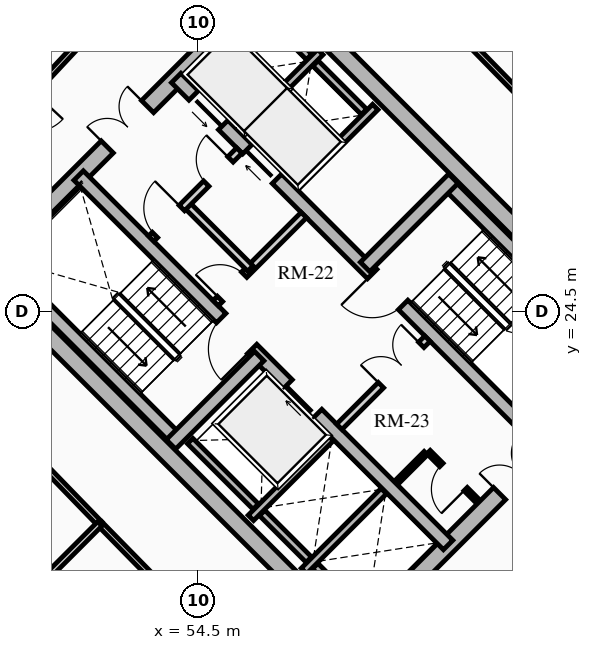
"""IFC4 building model, lengths in metres.
Left out: names, types, materials, properties, quantities, classifications, styles, units other than length and angle.
Written with IfcOpenShell. Run it as: python <this file> out.ifc"""

import sys

from ifc_helpers import new_model, si_unit, direction, frame, frame_2d, origin, place, context, subcontext, project, spatial, rectangle, extrude, source, transform, mapped, element, fill, save


model = new_model("IFC4")
c1 = context("Model", 3, precision=1e-05, world=origin(), true_north=direction((0.0, 1.0)))
c2 = subcontext(c1, "Body", "Model", "MODEL_VIEW")
j1 = project(units=[si_unit("LENGTHUNIT", "METRE"), si_unit("PLANEANGLEUNIT", "RADIAN")], contexts=[c1])
p1 = place(None, origin())
s1 = spatial("IfcSite", under=j1, at=p1, CompositionType="ELEMENT")
p2 = place(p1, origin())
s2 = spatial("IfcBuilding", under=s1, at=p2, CompositionType="ELEMENT")
p3 = place(p2, frame((0.0, 0.0, 78.88)))
s3 = spatial("IfcBuildingStorey", under=s2, at=p3, CompositionType="ELEMENT", Elevation=78.88)
for number, where, z_axis, x_axis in (
    (1, (58.737, 15.697, 0.0), (0.0, 0.0, 1.0), (-0.707, 0.707, 0.0)),
    (2, (66.303, 23.263, 0.0), (0.0, 0.0, 1.0), (-0.707, 0.707, 0.0)),
):
    element("IfcWall", number, at=place(p3, frame(where, z_axis=z_axis, x_axis=x_axis)), inside=s3, PredefinedType="SHEAR", context=c2, shape_type="SweptSolid", body=[
        extrude(rectangle(XDim=14.2, YDim=0.45, at=frame_2d((7.1, 0.0))), origin(), (0.0, 0.0, 1.0), 2.91),
    ])
p4 = place(p3, frame((58.578, 15.856, 0.0), z_axis=(0.0, 0.0, 1.0), x_axis=(0.707106781187, 0.707106781187, 0.0)))
e3 = element("IfcWall", 3, at=p4, inside=s3, PredefinedType="SHEAR", context=c2, shape_type="SweptSolid", body=[
    extrude(rectangle(XDim=10.7, YDim=0.45, at=frame_2d((5.35, 0.0))), origin(), (0.0, 0.0, 1.0), 2.91),
])
m1 = source(origin(), c2, "Body", "SweptSolid", [
    extrude(rectangle(XDim=1.5, YDim=2.02, at=frame_2d((0.75, 1.01))), frame((0.0, 0.235, 0.0), z_axis=(0.0, -1.0, 0.0), x_axis=(1.0, 0.0, 0.0)), (0.0, 0.0, 1.0), 0.47),
])
p5 = place(p4, frame((5.45, 0.0, 0.0)))
e4 = element("IfcOpeningElement", 4, at=p5, cuts=e3, PredefinedType="OPENING", context=c2, shape_type="MappedRepresentation", body=[
    mapped(m1, transform((0.0, 0.0, 0.0), x_axis=(1.0, 0.0, 0.0), y_axis=(0.0, 1.0, 0.0), z_axis=(0.0, 0.0, 1.0), scale=1.0)),
])
p6 = place(p3, frame((48.856, 25.578, 0.0), z_axis=(0.0, 0.0, 1.0), x_axis=(0.707106781187, 0.707106781187, 0.0)))
e5 = element("IfcWall", 5, at=p6, inside=s3, PredefinedType="SHEAR", context=c2, shape_type="SweptSolid", body=[
    extrude(rectangle(XDim=10.7, YDim=0.45, at=frame_2d((5.35, 0.0))), origin(), (0.0, 0.0, 1.0), 2.91),
])
p7 = place(p6, frame((4.6, 0.0, 0.0)))
e6 = element("IfcOpeningElement", 6, at=p7, cuts=e5, PredefinedType="OPENING", context=c2, shape_type="MappedRepresentation", body=[
    mapped(m1, transform((0.0, 0.0, 0.0), x_axis=(1.0, 0.0, 0.0), y_axis=(0.0, 1.0, 0.0), z_axis=(0.0, 0.0, 1.0), scale=1.0)),
])
p8 = place(p3, frame((61.078, 18.355, 0.0), z_axis=(0.0, 0.0, 1.0), x_axis=(-0.707106781187, 0.707106781187, 0.0)))
e7 = element("IfcWall", 7, at=p8, inside=s3, PredefinedType="SHEAR", context=c2, shape_type="SweptSolid", body=[
    extrude(rectangle(XDim=13.75, YDim=0.35, at=frame_2d((6.875, 0.0))), origin(), (0.0, 0.0, 1.0), 2.91),
])
m2 = source(origin(), c2, "Body", "SweptSolid", [
    extrude(rectangle(XDim=1.1, YDim=2.015, at=frame_2d((0.55, 1.007))), frame((0.0, 0.185, 0.0), z_axis=(0.0, -1.0, 0.0), x_axis=(1.0, 0.0, 0.0)), (0.0, 0.0, 1.0), 0.37),
])
p9 = place(p8, frame((4.875, 0.0, 0.0)))
e8 = element("IfcOpeningElement", 8, at=p9, cuts=e7, PredefinedType="OPENING", context=c2, shape_type="MappedRepresentation", body=[
    mapped(m2, transform((0.0, 0.0, 0.0), x_axis=(1.0, 0.0, 0.0), y_axis=(0.0, 1.0, 0.0), z_axis=(0.0, 0.0, 1.0), scale=1.0)),
])
m3 = source(origin(), c2, "Body", "SweptSolid", [
    extrude(rectangle(XDim=1.15, YDim=2.02, at=frame_2d((0.575, 1.01))), frame((0.0, 0.185, 0.0), z_axis=(0.0, -1.0, 0.0), x_axis=(1.0, 0.0, 0.0)), (0.0, 0.0, 1.0), 0.37),
])
p10 = place(p8, frame((7.295, 0.0, 0.0)))
e9 = element("IfcOpeningElement", 9, at=p10, cuts=e7, PredefinedType="OPENING", context=c2, shape_type="MappedRepresentation", body=[
    mapped(m3, transform((0.0, 0.0, 0.0), x_axis=(1.0, 0.0, 0.0), y_axis=(0.0, 1.0, 0.0), z_axis=(0.0, 0.0, 1.0), scale=1.0)),
])
p11 = place(p3, frame((63.645, 20.922, 0.0), z_axis=(0.0, 0.0, 1.0), x_axis=(-0.707106781187, 0.707106781187, 0.0)))
e10 = element("IfcWall", 10, at=p11, inside=s3, PredefinedType="SHEAR", context=c2, shape_type="SweptSolid", body=[
    extrude(rectangle(XDim=13.75, YDim=0.35, at=frame_2d((6.875, 0.0))), origin(), (0.0, 0.0, 1.0), 2.91),
])
p12 = place(p11, frame((10.0, 0.0, 0.0)))
e11 = element("IfcOpeningElement", 11, at=p12, cuts=e10, PredefinedType="OPENING", context=c2, shape_type="MappedRepresentation", body=[
    mapped(m2, transform((0.0, 0.0, 0.0), x_axis=(1.0, 0.0, 0.0), y_axis=(0.0, 1.0, 0.0), z_axis=(0.0, 0.0, 1.0), scale=1.0)),
])
p13 = place(p11, frame((12.0, 0.0, 0.0)))
e12 = element("IfcOpeningElement", 12, at=p13, cuts=e10, PredefinedType="OPENING", context=c2, shape_type="MappedRepresentation", body=[
    mapped(m2, transform((0.0, 0.0, 0.0), x_axis=(1.0, 0.0, 0.0), y_axis=(0.0, 1.0, 0.0), z_axis=(0.0, 0.0, 1.0), scale=1.0)),
])
p14 = place(p11, frame((5.305, 0.0, 0.0)))
e13 = element("IfcOpeningElement", 13, at=p14, cuts=e10, PredefinedType="OPENING", context=c2, shape_type="MappedRepresentation", body=[
    mapped(m3, transform((0.0, 0.0, 0.0), x_axis=(1.0, 0.0, 0.0), y_axis=(0.0, 1.0, 0.0), z_axis=(0.0, 0.0, 1.0), scale=1.0)),
])
p15 = place(p3, frame((53.922, 21.141, 0.0), z_axis=(0.0, 0.0, 1.0), x_axis=(-0.707088616009, 0.707124945897, 0.0)))
e14 = element("IfcWall", 14, at=p15, inside=s3, PredefinedType="SHEAR", context=c2, shape_type="SweptSolid", body=[
    extrude(rectangle(XDim=6.72, YDim=0.35, at=frame_2d((3.36, 0.0))), origin(), (0.0, 0.0, 1.0), 2.91),
])
p16 = place(p3, frame((53.784, 21.003, 0.0), z_axis=(0.0, 0.0, 1.0), x_axis=(0.707106781187, 0.707106781187, 0.0)))
e15 = element("IfcWall", 15, at=p16, inside=s3, PredefinedType="SHEAR", context=c2, shape_type="SweptSolid", body=[
    extrude(rectangle(XDim=3.285, YDim=0.35, at=frame_2d((1.643, 0.0))), origin(), (0.0, 0.0, 1.0), 2.91),
])
p17 = place(p3, frame((65.83, 23.107, 0.0), z_axis=(0.0, 0.0, 1.0), x_axis=(-0.707088616009, 0.707124945897, 0.0)))
e16 = element("IfcWall", 16, at=p17, inside=s3, PredefinedType="SHEAR", context=c2, shape_type="SweptSolid", body=[
    extrude(rectangle(XDim=6.72, YDim=0.35, at=frame_2d((3.36, 0.0))), origin(), (0.0, 0.0, 1.0), 2.91),
])
p18 = place(p3, frame((58.893, 25.674, 0.0), z_axis=(0.0, 0.0, 1.0), x_axis=(0.707106781187, 0.707106781187, 0.0)))
e17 = element("IfcWall", 17, at=p18, inside=s3, PredefinedType="SHEAR", context=c2, shape_type="SweptSolid", body=[
    extrude(rectangle(XDim=3.285, YDim=0.35, at=frame_2d((1.643, 0.0))), origin(), (0.0, 0.0, 1.0), 2.91),
])
p19 = place(p3, frame((55.888, 19.069, 0.0), z_axis=(0.0, 0.0, 1.0), x_axis=(0.707106781187, 0.707106781187, 0.0)))
e18 = element("IfcWall", 18, at=p19, inside=s3, PredefinedType="SHEAR", context=c2, shape_type="SweptSolid", body=[
    extrude(rectangle(XDim=2.97, YDim=0.2, at=frame_2d((1.485, 0.0))), origin(), (0.0, 0.0, 1.0), 2.91),
])
p20 = place(p3, frame((56.015, 19.366, 0.0), z_axis=(0.0, 0.0, 1.0), x_axis=(-0.707106781187, 0.707106781187, 0.0)))
e19 = element("IfcWall", 19, at=p20, inside=s3, PredefinedType="SHEAR", context=c2, shape_type="SweptSolid", body=[
    extrude(rectangle(XDim=2.44, YDim=0.2, at=frame_2d((1.22, 0.0))), origin(), (0.0, 0.0, 1.0), 2.91),
])
p21 = place(p3, frame((57.284, 17.673, 0.0), z_axis=(0.0, 0.0, 1.0), x_axis=(0.707147878904, 0.70706568108, 0.0)))
e20 = element("IfcWall", 20, at=p21, inside=s3, PredefinedType="SHEAR", context=c2, shape_type="SweptSolid", body=[
    extrude(rectangle(XDim=2.97, YDim=0.2, at=frame_2d((1.485, 0.0))), origin(), (0.0, 0.0, 1.0), 2.91),
])
p22 = place(p3, frame((57.412, 17.97, 0.0), z_axis=(0.0, 0.0, 1.0), x_axis=(-0.707106781187, 0.707106781187, 0.0)))
e21 = element("IfcWall", 21, at=p22, inside=s3, PredefinedType="SHEAR", context=c2, shape_type="SweptSolid", body=[
    extrude(rectangle(XDim=1.735, YDim=0.2, at=frame_2d((0.867, 0.0))), origin(), (0.0, 0.0, 1.0), 2.91),
])
p23 = place(p3, frame((58.737, 16.644, 0.0), z_axis=(0.0, 0.0, 1.0), x_axis=(-0.707032117043, 0.707181437447, 0.0)))
e22 = element("IfcWall", 22, at=p23, inside=s3, PredefinedType="SHEAR", context=c2, shape_type="SweptSolid", body=[
    extrude(rectangle(XDim=1.635, YDim=0.2, at=frame_2d((0.817, 0.0))), origin(), (0.0, 0.0, 1.0), 2.91),
])
p24 = place(p3, frame((57.062, 27.781, 0.0), z_axis=(0.0, 0.0, 1.0), x_axis=(0.707106781187, 0.707106781187, 0.0)))
e23 = element("IfcWall", 23, at=p24, inside=s3, PredefinedType="SHEAR", context=c2, shape_type="SweptSolid", body=[
    extrude(rectangle(XDim=2.97, YDim=0.2, at=frame_2d((1.485, 0.0))), origin(), (0.0, 0.0, 1.0), 2.91),
])
p25 = place(p3, frame((55.615, 29.227, 0.0), z_axis=(0.0, 0.0, 1.0), x_axis=(0.707147878904, 0.70706568108, 0.0)))
e24 = element("IfcWall", 24, at=p25, inside=s3, PredefinedType="SHEAR", context=c2, shape_type="SweptSolid", body=[
    extrude(rectangle(XDim=2.97, YDim=0.2, at=frame_2d((1.485, 0.0))), origin(), (0.0, 0.0, 1.0), 2.91),
])
p26 = place(p3, frame((58.865, 29.754, 0.0), z_axis=(0.0, 0.0, 1.0), x_axis=(-0.707174411312, 0.707039144592, 0.0)))
e25 = element("IfcWall", 25, at=p26, inside=s3, PredefinedType="SHEAR", context=c2, shape_type="SweptSolid", body=[
    extrude(rectangle(XDim=1.805, YDim=0.2, at=frame_2d((0.902, 0.0))), origin(), (0.0, 0.0, 1.0), 2.91),
])
p27 = place(p3, frame((57.419, 31.2, 0.0), z_axis=(0.0, 0.0, 1.0), x_axis=(-0.707032117043, 0.707181437447, 0.0)))
e26 = element("IfcWall", 26, at=p27, inside=s3, PredefinedType="SHEAR", context=c2, shape_type="SweptSolid", body=[
    extrude(rectangle(XDim=1.635, YDim=0.2, at=frame_2d((0.817, 0.0))), origin(), (0.0, 0.0, 1.0), 2.91),
])
p28 = place(p3, frame((58.214, 21.467, 0.0), z_axis=(0.0, 0.0, 1.0), x_axis=(0.707106781187, 0.707106781187, 0.0)))
e27 = element("IfcWall", 27, at=p28, inside=s3, PredefinedType="PARTITIONING", context=c2, shape_type="SweptSolid", body=[
    extrude(rectangle(XDim=3.28, YDim=0.2, at=frame_2d((1.64, 0.0))), origin(), (0.0, 0.0, 1.0), 2.655),
])
m4 = source(origin(), c2, "Body", "SweptSolid", [
    extrude(rectangle(XDim=1.5, YDim=2.02, at=frame_2d((0.75, 1.01))), frame((0.0, 0.11, 0.0), z_axis=(0.0, -1.0, 0.0), x_axis=(1.0, 0.0, 0.0)), (0.0, 0.0, 1.0), 0.22),
])
p29 = place(p28, frame((1.55, 0.0, 0.0)))
e28 = element("IfcOpeningElement", 28, at=p29, cuts=e27, PredefinedType="OPENING", context=c2, shape_type="MappedRepresentation", body=[
    mapped(m4, transform((0.0, 0.0, 0.0), x_axis=(1.0, 0.0, 0.0), y_axis=(0.0, 1.0, 0.0), z_axis=(0.0, 0.0, 1.0), scale=1.0)),
])
p30 = place(p3, frame((54.961, 24.719, 0.0), z_axis=(0.0, 0.0, 1.0), x_axis=(0.707106781187, 0.707106781187, 0.0)))
e29 = element("IfcWall", 29, at=p30, inside=s3, PredefinedType="PARTITIONING", context=c2, shape_type="SweptSolid", body=[
    extrude(rectangle(XDim=3.28, YDim=0.2, at=frame_2d((1.64, 0.0))), origin(), (0.0, 0.0, 1.0), 2.655),
])
m5 = source(origin(), c2, "Body", "SweptSolid", [
    extrude(rectangle(XDim=0.9, YDim=2.005, at=frame_2d((0.45, 1.002))), frame((0.0, 0.11, 0.0), z_axis=(0.0, -1.0, 0.0), x_axis=(1.0, 0.0, 0.0)), (0.0, 0.0, 1.0), 0.22),
])
p31 = place(p30, frame((0.16, 0.0, 0.0)))
e30 = element("IfcOpeningElement", 30, at=p31, cuts=e29, PredefinedType="OPENING", context=c2, shape_type="MappedRepresentation", body=[
    mapped(m5, transform((0.0, 0.0, 0.0), x_axis=(1.0, 0.0, 0.0), y_axis=(0.0, 1.0, 0.0), z_axis=(0.0, 0.0, 1.0), scale=1.0)),
])
p32 = place(p3, frame((55.874, 25.631, 0.0), z_axis=(0.0, 0.0, 1.0), x_axis=(-0.707157639372, 0.707055919343, 0.0)))
e31 = element("IfcWall", 31, at=p32, inside=s3, PredefinedType="PARTITIONING", context=c2, shape_type="SweptSolid", body=[
    extrude(rectangle(XDim=2.4, YDim=0.2, at=frame_2d((1.2, 0.0))), origin(), (0.0, 0.0, 1.0), 2.655),
])
p33 = place(p3, frame((53.264, 26.416, 0.0), z_axis=(0.0, 0.0, 1.0), x_axis=(0.707106781187, 0.707106781187, 0.0)))
e32 = element("IfcWall", 32, at=p33, inside=s3, PredefinedType="PARTITIONING", context=c2, shape_type="SweptSolid", body=[
    extrude(rectangle(XDim=3.28, YDim=0.2, at=frame_2d((1.64, 0.0))), origin(), (0.0, 0.0, 1.0), 2.655),
])
m6 = source(origin(), c2, "Body", "SweptSolid", [
    extrude(rectangle(XDim=1.0, YDim=2.015, at=frame_2d((0.5, 1.007))), frame((0.0, 0.11, 0.0), z_axis=(0.0, -1.0, 0.0), x_axis=(1.0, 0.0, 0.0)), (0.0, 0.0, 1.0), 0.22),
])
p34 = place(p33, frame((0.14, 0.0, 0.0)))
e33 = element("IfcOpeningElement", 33, at=p34, cuts=e32, PredefinedType="OPENING", context=c2, shape_type="MappedRepresentation", body=[
    mapped(m6, transform((0.0, 0.0, 0.0), x_axis=(1.0, 0.0, 0.0), y_axis=(0.0, 1.0, 0.0), z_axis=(0.0, 0.0, 1.0), scale=1.0)),
])
p35 = place(p33, frame((2.05, 0.0, 0.0)))
e34 = element("IfcOpeningElement", 34, at=p35, cuts=e32, PredefinedType="OPENING", context=c2, shape_type="MappedRepresentation", body=[
    mapped(m5, transform((0.0, 0.0, 0.0), x_axis=(1.0, 0.0, 0.0), y_axis=(0.0, 1.0, 0.0), z_axis=(0.0, 0.0, 1.0), scale=1.0)),
])
p36 = place(p3, frame((61.835, 19.529, 0.0), z_axis=(0.0, 0.0, 1.0), x_axis=(-0.707174592913, 0.707038962956, 0.0)))
e35 = element("IfcWall", 35, at=p36, inside=s3, PredefinedType="PARTITIONING", context=c2, shape_type="SweptSolid", body=[
    extrude(rectangle(XDim=1.8, YDim=0.125, at=frame_2d((0.9, 0.0))), origin(), (0.0, 0.0, 1.0), 2.655),
])
m7 = source(origin(), c2, "Body", "SweptSolid", [
    extrude(rectangle(XDim=0.9, YDim=2.005, at=frame_2d((0.45, 1.002))), frame((0.0, 0.073, 0.0), z_axis=(0.0, -1.0, 0.0), x_axis=(1.0, 0.0, 0.0)), (0.0, 0.0, 1.0), 0.145),
])
p37 = place(p36, frame((0.42, 0.0, 0.0)))
e36 = element("IfcOpeningElement", 36, at=p37, cuts=e35, PredefinedType="OPENING", context=c2, shape_type="MappedRepresentation", body=[
    mapped(m7, transform((0.0, 0.0, 0.0), x_axis=(1.0, 0.0, 0.0), y_axis=(0.0, 1.0, 0.0), z_axis=(0.0, 0.0, 1.0), scale=1.0)),
])
p38 = place(p3, frame((59.713, 19.996, 0.0), z_axis=(0.0, 0.0, 1.0), x_axis=(0.707217726, 0.706995818963, 0.0)))
e37 = element("IfcWall", 37, at=p38, inside=s3, PredefinedType="PARTITIONING", context=c2, shape_type="SweptSolid", body=[
    extrude(rectangle(XDim=1.1, YDim=0.125, at=frame_2d((0.55, 0.0))), origin(), (0.0, 0.0, 1.0), 2.655),
])
p39 = place(p3, frame((63.086, 30.086, 0.0), z_axis=(0.0, 0.0, 1.0), x_axis=(-0.699075897379, 0.715047473741, 0.0)))
e38 = element("IfcWall", 38, at=p39, inside=s3, PredefinedType="PARTITIONING", context=c2, shape_type="SweptSolid", body=[
    extrude(rectangle(XDim=6.114, YDim=0.15, at=frame_2d((3.057, 0.0))), origin(), (0.0, 0.0, 1.0), 2.225),
])
p40 = place(p3, frame((52.043, 32.28, 0.0), z_axis=(0.0, 0.0, 1.0), x_axis=(-0.682606081633, -0.730786519661, 0.0)))
e39 = element("IfcWall", 39, at=p40, inside=s3, PredefinedType="PARTITIONING", context=c2, shape_type="SweptSolid", body=[
    extrude(rectangle(XDim=6.527, YDim=0.15, at=frame_2d((3.263, 0.0))), origin(), (0.0, 0.0, 1.0), 2.225),
])
m8 = source(origin(), c2, "Body", "SweptSolid", [
    extrude(rectangle(XDim=1.05, YDim=2.015, at=frame_2d((0.525, 1.007))), frame((0.0, 0.085, 0.0), z_axis=(0.0, -1.0, 0.0), x_axis=(1.0, 0.0, 0.0)), (0.0, 0.0, 1.0), 0.17),
])
p41 = place(p40, frame((2.738, 0.0, 0.0)))
e40 = element("IfcOpeningElement", 40, at=p41, cuts=e39, PredefinedType="OPENING", context=c2, shape_type="MappedRepresentation", body=[
    mapped(m8, transform((0.0, 0.0, 0.0), x_axis=(1.0, 0.0, 0.0), y_axis=(0.0, 1.0, 0.0), z_axis=(0.0, 0.0, 1.0), scale=1.0)),
])
p42 = place(p3, frame((47.706, 23.253, 0.0), z_axis=(0.0, 0.0, 1.0), x_axis=(0.696179266346, -0.717867974707, 0.0)))
e41 = element("IfcWall", 41, at=p42, inside=s3, PredefinedType="PARTITIONING", context=c2, shape_type="SweptSolid", body=[
    extrude(rectangle(XDim=6.045, YDim=0.15, at=frame_2d((3.022, 0.0))), origin(), (0.0, 0.0, 1.0), 2.655),
])
p43 = place(p42, frame((2.497, 0.0, 0.0)))
e42 = element("IfcOpeningElement", 42, at=p43, cuts=e41, PredefinedType="OPENING", context=c2, shape_type="MappedRepresentation", body=[
    mapped(m8, transform((0.0, 0.0, 0.0), x_axis=(1.0, 0.0, 0.0), y_axis=(0.0, 1.0, 0.0), z_axis=(0.0, 0.0, 1.0), scale=1.0)),
])
p44 = place(p3, frame((51.914, 18.914, 0.0), z_axis=(0.0, 0.0, 1.0), x_axis=(0.699999313799, -0.714143515465, 0.0)))
e43 = element("IfcWall", 43, at=p44, inside=s3, PredefinedType="PARTITIONING", context=c2, shape_type="SweptSolid", body=[
    extrude(rectangle(XDim=6.162, YDim=0.15, at=frame_2d((3.081, 0.0))), origin(), (0.0, 0.0, 1.0), 2.225),
])
p45 = place(p3, frame((51.914, 18.914, 0.0), z_axis=(0.0, 0.0, 1.0), x_axis=(-0.707106781187, -0.707106781187, 0.0)))
e44 = element("IfcWall", 44, at=p45, inside=s3, PredefinedType="PARTITIONING", context=c2, shape_type="SweptSolid", body=[
    extrude(rectangle(XDim=7.661, YDim=0.16, at=frame_2d((3.831, 0.0))), origin(), (0.0, 0.0, 1.0), 2.179),
])
m9 = source(origin(), c2, "Body", "SweptSolid", [
    extrude(rectangle(XDim=1.1, YDim=2.015, at=frame_2d((0.55, 1.007))), frame((0.0, 0.025, 0.0), z_axis=(0.0, -1.0, 0.0), x_axis=(1.0, 0.0, 0.0)), (0.0, 0.0, 1.0), 0.05),
])
p46 = place(p9, origin())
e45 = element("IfcDoor", 45, at=p46, inside=s3, OperationType="SLIDING_TO_RIGHT", PredefinedType="DOOR", context=c2, shape_type="MappedRepresentation", body=[
    mapped(m9, transform((0.0, 0.0, 0.0), x_axis=(1.0, 0.0, 0.0), y_axis=(0.0, 1.0, 0.0), z_axis=(0.0, 0.0, 1.0), scale=1.0)),
])
fill(e8, e45)
p47 = place(p12, origin())
e46 = element("IfcDoor", 46, at=p47, inside=s3, OperationType="SLIDING_TO_RIGHT", PredefinedType="DOOR", context=c2, shape_type="MappedRepresentation", body=[
    mapped(m9, transform((0.0, 0.0, 0.0), x_axis=(1.0, 0.0, 0.0), y_axis=(0.0, 1.0, 0.0), z_axis=(0.0, 0.0, 1.0), scale=1.0)),
])
fill(e11, e46)
p48 = place(p13, origin())
e47 = element("IfcDoor", 47, at=p48, inside=s3, OperationType="SLIDING_TO_LEFT", PredefinedType="DOOR", context=c2, shape_type="MappedRepresentation", body=[
    mapped(m9, transform((0.0, 0.0, 0.0), x_axis=(1.0, 0.0, 0.0), y_axis=(0.0, 1.0, 0.0), z_axis=(0.0, 0.0, 1.0), scale=1.0)),
])
fill(e12, e47)
m10 = source(origin(), c2, "Body", "SweptSolid", [
    extrude(rectangle(XDim=1.15, YDim=2.02, at=frame_2d((0.575, 1.01))), frame((0.0, 0.025, 0.0), z_axis=(0.0, -1.0, 0.0), x_axis=(1.0, 0.0, 0.0)), (0.0, 0.0, 1.0), 0.05),
])
p49 = place(p10, origin())
e48 = element("IfcDoor", 48, at=p49, inside=s3, OperationType="SINGLE_SWING_LEFT", PredefinedType="DOOR", context=c2, shape_type="MappedRepresentation", body=[
    mapped(m10, transform((0.0, 0.0, 0.0), x_axis=(1.0, 0.0, 0.0), y_axis=(0.0, 1.0, 0.0), z_axis=(0.0, 0.0, 1.0), scale=1.0)),
])
fill(e9, e48)
p50 = place(p14, origin())
e49 = element("IfcDoor", 49, at=p50, inside=s3, OperationType="SINGLE_SWING_RIGHT", PredefinedType="DOOR", context=c2, shape_type="MappedRepresentation", body=[
    mapped(m10, transform((0.0, 0.0, 0.0), x_axis=(1.0, 0.0, 0.0), y_axis=(0.0, 1.0, 0.0), z_axis=(0.0, 0.0, 1.0), scale=1.0)),
])
fill(e13, e49)
m11 = source(origin(), c2, "Body", "SweptSolid", [
    extrude(rectangle(XDim=1.5, YDim=2.02, at=frame_2d((0.75, 1.01))), frame((0.0, 0.025, 0.0), z_axis=(0.0, -1.0, 0.0), x_axis=(1.0, 0.0, 0.0)), (0.0, 0.0, 1.0), 0.05),
])
p51 = place(p7, origin())
e50 = element("IfcDoor", 50, at=p51, inside=s3, OperationType="DOUBLE_DOOR_SINGLE_SWING", PredefinedType="DOOR", context=c2, shape_type="MappedRepresentation", body=[
    mapped(m11, transform((0.0, 0.0, 0.0), x_axis=(1.0, 0.0, 0.0), y_axis=(0.0, 1.0, 0.0), z_axis=(0.0, 0.0, 1.0), scale=1.0)),
])
fill(e6, e50)
p52 = place(p5, origin())
e51 = element("IfcDoor", 51, at=p52, inside=s3, OperationType="DOUBLE_DOOR_SINGLE_SWING", PredefinedType="DOOR", context=c2, shape_type="MappedRepresentation", body=[
    mapped(m11, transform((0.0, 0.0, 0.0), x_axis=(1.0, 0.0, 0.0), y_axis=(0.0, 1.0, 0.0), z_axis=(0.0, 0.0, 1.0), scale=1.0)),
])
fill(e4, e51)
p53 = place(p29, origin())
e52 = element("IfcDoor", 52, at=p53, inside=s3, OperationType="DOUBLE_DOOR_SINGLE_SWING", PredefinedType="DOOR", context=c2, shape_type="MappedRepresentation", body=[
    mapped(m11, transform((0.0, 0.0, 0.0), x_axis=(1.0, 0.0, 0.0), y_axis=(0.0, 1.0, 0.0), z_axis=(0.0, 0.0, 1.0), scale=1.0)),
])
fill(e28, e52)
m12 = source(origin(), c2, "Body", "SweptSolid", [
    extrude(rectangle(XDim=0.9, YDim=2.005, at=frame_2d((0.45, 1.002))), frame((0.0, 0.025, 0.0), z_axis=(0.0, -1.0, 0.0), x_axis=(1.0, 0.0, 0.0)), (0.0, 0.0, 1.0), 0.05),
])
p54 = place(p31, origin())
e53 = element("IfcDoor", 53, at=p54, inside=s3, OperationType="SINGLE_SWING_LEFT", PredefinedType="DOOR", context=c2, shape_type="MappedRepresentation", body=[
    mapped(m12, transform((0.0, 0.0, 0.0), x_axis=(1.0, 0.0, 0.0), y_axis=(0.0, 1.0, 0.0), z_axis=(0.0, 0.0, 1.0), scale=1.0)),
])
fill(e30, e53)
m13 = source(origin(), c2, "Body", "SweptSolid", [
    extrude(rectangle(XDim=1.0, YDim=2.015, at=frame_2d((0.5, 1.007))), frame((0.0, 0.025, 0.0), z_axis=(0.0, -1.0, 0.0), x_axis=(1.0, 0.0, 0.0)), (0.0, 0.0, 1.0), 0.05),
])
p55 = place(p34, origin())
e54 = element("IfcDoor", 54, at=p55, inside=s3, OperationType="SINGLE_SWING_RIGHT", PredefinedType="DOOR", context=c2, shape_type="MappedRepresentation", body=[
    mapped(m13, transform((0.0, 0.0, 0.0), x_axis=(1.0, 0.0, 0.0), y_axis=(0.0, 1.0, 0.0), z_axis=(0.0, 0.0, 1.0), scale=1.0)),
])
fill(e33, e54)
p56 = place(p37, origin())
e55 = element("IfcDoor", 55, at=p56, inside=s3, OperationType="SINGLE_SWING_LEFT", PredefinedType="DOOR", context=c2, shape_type="MappedRepresentation", body=[
    mapped(m12, transform((0.0, 0.0, 0.0), x_axis=(1.0, 0.0, 0.0), y_axis=(0.0, 1.0, 0.0), z_axis=(0.0, 0.0, 1.0), scale=1.0)),
])
fill(e36, e55)
p57 = place(p35, origin())
e56 = element("IfcDoor", 56, at=p57, inside=s3, OperationType="SINGLE_SWING_RIGHT", PredefinedType="DOOR", context=c2, shape_type="MappedRepresentation", body=[
    mapped(m12, transform((0.0, 0.0, 0.0), x_axis=(1.0, 0.0, 0.0), y_axis=(0.0, 1.0, 0.0), z_axis=(0.0, 0.0, 1.0), scale=1.0)),
])
fill(e34, e56)
save(model, sys.argv[1])
